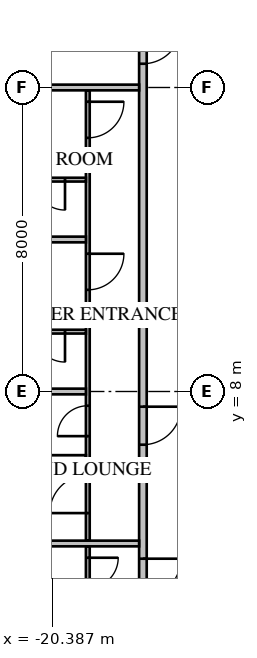
"""IFC4 building model, lengths in metres.
Left out: names, types, materials, properties, quantities, classifications, styles, units other than length and angle.
Written with IfcOpenShell. Run it as: python <this file> out.ifc"""

import sys

from ifc_helpers import new_model, si_unit, direction, frame, frame_2d, origin, place, context, subcontext, project, spatial, rectangle, extrude, element, fill, save


model = new_model("IFC4")
c1 = context("Model", 3, precision=1e-05, world=origin(), true_north=direction((0.0, 1.0)))
c2 = subcontext(c1, "Body", "Model", "MODEL_VIEW")
j1 = project(units=[si_unit("LENGTHUNIT", "METRE"), si_unit("PLANEANGLEUNIT", "RADIAN")], contexts=[c1])
p1 = place(None, origin())
s1 = spatial("IfcSite", under=j1, at=p1, CompositionType="ELEMENT")
p2 = place(p1, origin())
s2 = spatial("IfcBuilding", under=s1, at=p2, CompositionType="ELEMENT")
p3 = place(p2, frame((0.0, 0.0, 27.55)))
s3 = spatial("IfcBuildingStorey", under=s2, at=p3, CompositionType="ELEMENT", Elevation=27.55)
p4 = place(p3, frame((-18.0, 18.0, 0.0), z_axis=(0.0, 0.0, 1.0), x_axis=(0.0, -1.0, 0.0)))
e1 = element("IfcWall", 1, at=p4, inside=s3, PredefinedType="PARTITIONING", context=c2, shape_type="SweptSolid", body=[
    extrude(rectangle(XDim=36.0, YDim=0.2, at=frame_2d((18.0, 0.0))), origin(), (0.0, 0.0, 1.0), 3.65),
])
p5 = place(p4, frame((10.4, 0.0, 0.0)))
e2 = element("IfcOpeningElement", 2, at=p5, cuts=e1, PredefinedType="OPENING", context=c2, shape_type="SweptSolid", body=[
    extrude(rectangle(XDim=1.0, YDim=2.1, at=frame_2d((0.5, 1.05))), frame((0.0, 0.12, 0.0), z_axis=(0.0, -1.0, 0.0), x_axis=(1.0, 0.0, 0.0)), (0.0, 0.0, 1.0), 0.24),
])
p6 = place(p4, frame((14.4, 0.0, 0.0)))
e3 = element("IfcOpeningElement", 3, at=p6, cuts=e1, PredefinedType="OPENING", context=c2, shape_type="SweptSolid", body=[
    extrude(rectangle(XDim=1.0, YDim=2.1, at=frame_2d((0.5, 1.05))), frame((0.0, 0.12, 0.0), z_axis=(0.0, -1.0, 0.0), x_axis=(1.0, 0.0, 0.0)), (0.0, 0.0, 1.0), 0.24),
])
p7 = place(p4, frame((0.375, 0.0, 0.0)))
e4 = element("IfcOpeningElement", 4, at=p7, cuts=e1, PredefinedType="OPENING", context=c2, shape_type="SweptSolid", body=[
    extrude(rectangle(XDim=1.0, YDim=2.1, at=frame_2d((0.5, 1.05))), frame((0.0, 0.12, 0.0), z_axis=(0.0, -1.0, 0.0), x_axis=(1.0, 0.0, 0.0)), (0.0, 0.0, 1.0), 0.24),
])
p8 = place(p4, frame((34.375, 0.0, 0.0)))
e5 = element("IfcOpeningElement", 5, at=p8, cuts=e1, PredefinedType="OPENING", context=c2, shape_type="SweptSolid", body=[
    extrude(rectangle(XDim=0.95, YDim=2.1, at=frame_2d((0.475, 1.05))), frame((0.0, 0.12, 0.0), z_axis=(0.0, -1.0, 0.0), x_axis=(1.0, 0.0, 0.0)), (0.0, 0.0, 1.0), 0.24),
])
p9 = place(p3, frame((-19.45, 15.925, 0.0), z_axis=(0.0, 0.0, 1.0), x_axis=(0.0, -1.0, 0.0)))
e6 = element("IfcWall", 6, at=p9, inside=s3, PredefinedType="PARTITIONING", context=c2, shape_type="SweptSolid", body=[
    extrude(rectangle(XDim=11.85, YDim=0.1, at=frame_2d((5.925, 0.0))), origin(), (0.0, 0.0, 1.0), 3.65),
])
p10 = place(p9, frame((10.125, 0.0, 0.0)))
e7 = element("IfcOpeningElement", 7, at=p10, cuts=e6, PredefinedType="OPENING", context=c2, shape_type="SweptSolid", body=[
    extrude(rectangle(XDim=1.0, YDim=2.1, at=frame_2d((0.5, 1.05))), frame((0.0, 0.07, 0.0), z_axis=(0.0, -1.0, 0.0), x_axis=(1.0, 0.0, 0.0)), (0.0, 0.0, 1.0), 0.14),
])
p11 = place(p9, frame((8.3, 0.0, 0.0)))
e8 = element("IfcOpeningElement", 8, at=p11, cuts=e6, PredefinedType="OPENING", context=c2, shape_type="SweptSolid", body=[
    extrude(rectangle(XDim=0.8, YDim=2.1, at=frame_2d((0.4, 1.05))), frame((0.0, 0.07, 0.0), z_axis=(0.0, -1.0, 0.0), x_axis=(1.0, 0.0, 0.0)), (0.0, 0.0, 1.0), 0.14),
])
p12 = place(p9, frame((0.3, 0.0, 0.0)))
e9 = element("IfcOpeningElement", 9, at=p12, cuts=e6, PredefinedType="OPENING", context=c2, shape_type="SweptSolid", body=[
    extrude(rectangle(XDim=0.95, YDim=2.1, at=frame_2d((0.475, 1.05))), frame((0.0, 0.07, 0.0), z_axis=(0.0, -1.0, 0.0), x_axis=(1.0, 0.0, 0.0)), (0.0, 0.0, 1.0), 0.14),
])
p13 = place(p9, frame((4.3, 0.0, 0.0)))
e10 = element("IfcOpeningElement", 10, at=p13, cuts=e6, PredefinedType="OPENING", context=c2, shape_type="SweptSolid", body=[
    extrude(rectangle(XDim=0.95, YDim=2.1, at=frame_2d((0.475, 1.05))), frame((0.0, 0.07, 0.0), z_axis=(0.0, -1.0, 0.0), x_axis=(1.0, 0.0, 0.0)), (0.0, 0.0, 1.0), 0.14),
])
p14 = place(p3, frame((-19.5, 6.275, 0.0), z_axis=(0.0, 0.0, 1.0), x_axis=(-1.0, 0.0, 0.0)))
e11 = element("IfcWall", 11, at=p14, inside=s3, PredefinedType="PARTITIONING", context=c2, shape_type="SweptSolid", body=[
    extrude(rectangle(XDim=2.1, YDim=0.1, at=frame_2d((1.05, 0.0))), origin(), (0.0, 0.0, 1.0), 3.65),
])
p15 = place(p3, frame((-19.45, 3.925, 0.0), z_axis=(0.0, 0.0, 1.0), x_axis=(0.0, -1.0, 0.0)))
e12 = element("IfcWall", 12, at=p15, inside=s3, PredefinedType="PARTITIONING", context=c2, shape_type="SweptSolid", body=[
    extrude(rectangle(XDim=19.85, YDim=0.1, at=frame_2d((9.925, 0.0))), origin(), (0.0, 0.0, 1.0), 3.65),
])
p16 = place(p15, frame((2.125, 0.0, 0.0)))
e13 = element("IfcOpeningElement", 13, at=p16, cuts=e12, PredefinedType="OPENING", context=c2, shape_type="SweptSolid", body=[
    extrude(rectangle(XDim=1.0, YDim=2.1, at=frame_2d((0.5, 1.05))), frame((0.0, 0.07, 0.0), z_axis=(0.0, -1.0, 0.0), x_axis=(1.0, 0.0, 0.0)), (0.0, 0.0, 1.0), 0.14),
])
p17 = place(p15, frame((0.3, 0.0, 0.0)))
e14 = element("IfcOpeningElement", 14, at=p17, cuts=e12, PredefinedType="OPENING", context=c2, shape_type="SweptSolid", body=[
    extrude(rectangle(XDim=0.8, YDim=2.1, at=frame_2d((0.4, 1.05))), frame((0.0, 0.07, 0.0), z_axis=(0.0, -1.0, 0.0), x_axis=(1.0, 0.0, 0.0)), (0.0, 0.0, 1.0), 0.14),
])
p18 = place(p15, frame((4.3, 0.0, 0.0)))
e15 = element("IfcOpeningElement", 15, at=p18, cuts=e12, PredefinedType="OPENING", context=c2, shape_type="SweptSolid", body=[
    extrude(rectangle(XDim=0.95, YDim=2.1, at=frame_2d((0.475, 1.05))), frame((0.0, 0.07, 0.0), z_axis=(0.0, -1.0, 0.0), x_axis=(1.0, 0.0, 0.0)), (0.0, 0.0, 1.0), 0.14),
])
p19 = place(p15, frame((8.3, 0.0, 0.0)))
e16 = element("IfcOpeningElement", 16, at=p19, cuts=e12, PredefinedType="OPENING", context=c2, shape_type="SweptSolid", body=[
    extrude(rectangle(XDim=0.95, YDim=2.1, at=frame_2d((0.475, 1.05))), frame((0.0, 0.07, 0.0), z_axis=(0.0, -1.0, 0.0), x_axis=(1.0, 0.0, 0.0)), (0.0, 0.0, 1.0), 0.14),
])
p20 = place(p15, frame((12.3, 0.0, 0.0)))
e17 = element("IfcOpeningElement", 17, at=p20, cuts=e12, PredefinedType="OPENING", context=c2, shape_type="SweptSolid", body=[
    extrude(rectangle(XDim=0.95, YDim=2.1, at=frame_2d((0.475, 1.05))), frame((0.0, 0.07, 0.0), z_axis=(0.0, -1.0, 0.0), x_axis=(1.0, 0.0, 0.0)), (0.0, 0.0, 1.0), 0.14),
])
p21 = place(p15, frame((16.3, 0.0, 0.0)))
e18 = element("IfcOpeningElement", 18, at=p21, cuts=e12, PredefinedType="OPENING", context=c2, shape_type="SweptSolid", body=[
    extrude(rectangle(XDim=0.95, YDim=2.1, at=frame_2d((0.475, 1.05))), frame((0.0, 0.07, 0.0), z_axis=(0.0, -1.0, 0.0), x_axis=(1.0, 0.0, 0.0)), (0.0, 0.0, 1.0), 0.14),
])
p22 = place(p3, frame((-18.1, 16.0, 0.0), z_axis=(0.0, 0.0, 1.0), x_axis=(-1.0, 0.0, 0.0)))
e19 = element("IfcWall", 19, at=p22, inside=s3, PredefinedType="PARTITIONING", context=c2, shape_type="SweptSolid", body=[
    extrude(rectangle(XDim=6.589, YDim=0.15, at=frame_2d((3.295, 0.0))), origin(), (0.0, 0.0, 1.0), 3.65),
])
for number, where, z_axis, x_axis in (
    (20, (-19.5, 12.0, 0.0), (0.0, 0.0, 1.0), (-1.0, 0.0, 0.0)),
    (21, (-19.5, 8.0, 0.0), (0.0, 0.0, 1.0), (-1.0, 0.0, 0.0)),
):
    element("IfcWall", number, at=place(p3, frame(where, z_axis=z_axis, x_axis=x_axis)), inside=s3, PredefinedType="PARTITIONING", context=c2, shape_type="SweptSolid", body=[
        extrude(rectangle(XDim=5.2, YDim=0.15, at=frame_2d((2.6, 0.0))), origin(), (0.0, 0.0, 1.0), 3.65),
    ])
p23 = place(p3, frame((-18.1, 4.0, 0.0), z_axis=(0.0, 0.0, 1.0), x_axis=(-1.0, 0.0, 0.0)))
e22 = element("IfcWall", 22, at=p23, inside=s3, PredefinedType="PARTITIONING", context=c2, shape_type="SweptSolid", body=[
    extrude(rectangle(XDim=6.6, YDim=0.15, at=frame_2d((3.3, 0.0))), origin(), (0.0, 0.0, 1.0), 3.65),
])
p24 = place(p3, frame((-19.5, 13.575, 0.0), z_axis=(0.0, 0.0, 1.0), x_axis=(-1.0, 0.0, 0.0)))
e23 = element("IfcWall", 23, at=p24, inside=s3, PredefinedType="PARTITIONING", context=c2, shape_type="SweptSolid", body=[
    extrude(rectangle(XDim=2.7, YDim=0.1, at=frame_2d((1.35, 0.0))), origin(), (0.0, 0.0, 1.0), 3.65),
])
p25 = place(p24, frame((0.55, 0.0, 0.0)))
e24 = element("IfcOpeningElement", 24, at=p25, cuts=e23, PredefinedType="OPENING", context=c2, shape_type="SweptSolid", body=[
    extrude(rectangle(XDim=0.8, YDim=2.1, at=frame_2d((0.4, 1.05))), frame((0.0, 0.07, 0.0), z_axis=(0.0, -1.0, 0.0), x_axis=(1.0, 0.0, 0.0)), (0.0, 0.0, 1.0), 0.14),
])
p26 = place(p3, frame((-19.5, 9.575, 0.0), z_axis=(0.0, 0.0, 1.0), x_axis=(-1.0, 0.0, 0.0)))
e25 = element("IfcWall", 25, at=p26, inside=s3, PredefinedType="PARTITIONING", context=c2, shape_type="SweptSolid", body=[
    extrude(rectangle(XDim=2.7, YDim=0.1, at=frame_2d((1.35, 0.0))), origin(), (0.0, 0.0, 1.0), 3.65),
])
p27 = place(p26, frame((0.55, 0.0, 0.0)))
e26 = element("IfcOpeningElement", 26, at=p27, cuts=e25, PredefinedType="OPENING", context=c2, shape_type="SweptSolid", body=[
    extrude(rectangle(XDim=0.8, YDim=2.1, at=frame_2d((0.4, 1.05))), frame((0.0, 0.07, 0.0), z_axis=(0.0, -1.0, 0.0), x_axis=(1.0, 0.0, 0.0)), (0.0, 0.0, 1.0), 0.14),
])
p28 = place(p5, origin())
e27 = element("IfcDoor", 27, at=p28, inside=s3, OperationType="SINGLE_SWING_LEFT", PredefinedType="DOOR", context=c2, shape_type="SweptSolid", body=[
    extrude(rectangle(XDim=1.0, YDim=2.1, at=frame_2d((0.5, 1.05))), frame((0.0, 0.025, 0.0), z_axis=(0.0, -1.0, 0.0), x_axis=(1.0, 0.0, 0.0)), (0.0, 0.0, 1.0), 0.05),
])
fill(e2, e27)
p29 = place(p10, origin())
e28 = element("IfcDoor", 28, at=p29, inside=s3, OperationType="SINGLE_SWING_RIGHT", PredefinedType="DOOR", context=c2, shape_type="SweptSolid", body=[
    extrude(rectangle(XDim=1.0, YDim=2.1, at=frame_2d((0.5, 1.05))), frame((0.0, 0.025, 0.0), z_axis=(0.0, -1.0, 0.0), x_axis=(1.0, 0.0, 0.0)), (0.0, 0.0, 1.0), 0.05),
])
fill(e7, e28)
p30 = place(p11, origin())
e29 = element("IfcDoor", 29, at=p30, inside=s3, OperationType="SINGLE_SWING_RIGHT", PredefinedType="DOOR", context=c2, shape_type="SweptSolid", body=[
    extrude(rectangle(XDim=0.8, YDim=2.1, at=frame_2d((0.4, 1.05))), frame((0.0, 0.025, 0.0), z_axis=(0.0, -1.0, 0.0), x_axis=(1.0, 0.0, 0.0)), (0.0, 0.0, 1.0), 0.05),
])
fill(e8, e29)
p31 = place(p6, origin())
e30 = element("IfcDoor", 30, at=p31, inside=s3, OperationType="SINGLE_SWING_LEFT", PredefinedType="DOOR", context=c2, shape_type="SweptSolid", body=[
    extrude(rectangle(XDim=1.0, YDim=2.1, at=frame_2d((0.5, 1.05))), frame((0.0, 0.025, 0.0), z_axis=(0.0, -1.0, 0.0), x_axis=(1.0, 0.0, 0.0)), (0.0, 0.0, 1.0), 0.05),
])
fill(e3, e30)
p32 = place(p17, origin())
e31 = element("IfcDoor", 31, at=p32, inside=s3, OperationType="SINGLE_SWING_LEFT", PredefinedType="DOOR", context=c2, shape_type="SweptSolid", body=[
    extrude(rectangle(XDim=0.8, YDim=2.1, at=frame_2d((0.4, 1.05))), frame((0.0, 0.025, 0.0), z_axis=(0.0, -1.0, 0.0), x_axis=(1.0, 0.0, 0.0)), (0.0, 0.0, 1.0), 0.05),
])
fill(e14, e31)
p33 = place(p7, origin())
e32 = element("IfcDoor", 32, at=p33, inside=s3, OperationType="SINGLE_SWING_LEFT", PredefinedType="DOOR", context=c2, shape_type="SweptSolid", body=[
    extrude(rectangle(XDim=1.0, YDim=2.1, at=frame_2d((0.5, 1.05))), frame((0.0, 0.025, 0.0), z_axis=(0.0, -1.0, 0.0), x_axis=(1.0, 0.0, 0.0)), (0.0, 0.0, 1.0), 0.05),
])
fill(e4, e32)
p34 = place(p12, origin())
e33 = element("IfcDoor", 33, at=p34, inside=s3, OperationType="SINGLE_SWING_LEFT", PredefinedType="DOOR", context=c2, shape_type="SweptSolid", body=[
    extrude(rectangle(XDim=0.95, YDim=2.1, at=frame_2d((0.475, 1.05))), frame((0.0, 0.025, 0.0), z_axis=(0.0, -1.0, 0.0), x_axis=(1.0, 0.0, 0.0)), (0.0, 0.0, 1.0), 0.05),
])
fill(e9, e33)
p35 = place(p25, origin())
e34 = element("IfcDoor", 34, at=p35, inside=s3, OperationType="SINGLE_SWING_LEFT", PredefinedType="DOOR", context=c2, shape_type="SweptSolid", body=[
    extrude(rectangle(XDim=0.8, YDim=2.1, at=frame_2d((0.4, 1.05))), frame((0.0, 0.025, 0.0), z_axis=(0.0, -1.0, 0.0), x_axis=(1.0, 0.0, 0.0)), (0.0, 0.0, 1.0), 0.05),
])
fill(e24, e34)
p36 = place(p13, origin())
e35 = element("IfcDoor", 35, at=p36, inside=s3, OperationType="SINGLE_SWING_LEFT", PredefinedType="DOOR", context=c2, shape_type="SweptSolid", body=[
    extrude(rectangle(XDim=0.95, YDim=2.1, at=frame_2d((0.475, 1.05))), frame((0.0, 0.025, 0.0), z_axis=(0.0, -1.0, 0.0), x_axis=(1.0, 0.0, 0.0)), (0.0, 0.0, 1.0), 0.05),
])
fill(e10, e35)
p37 = place(p27, origin())
e36 = element("IfcDoor", 36, at=p37, inside=s3, OperationType="SINGLE_SWING_LEFT", PredefinedType="DOOR", context=c2, shape_type="SweptSolid", body=[
    extrude(rectangle(XDim=0.8, YDim=2.1, at=frame_2d((0.4, 1.05))), frame((0.0, 0.025, 0.0), z_axis=(0.0, -1.0, 0.0), x_axis=(1.0, 0.0, 0.0)), (0.0, 0.0, 1.0), 0.05),
])
fill(e26, e36)
save(model, sys.argv[1])
